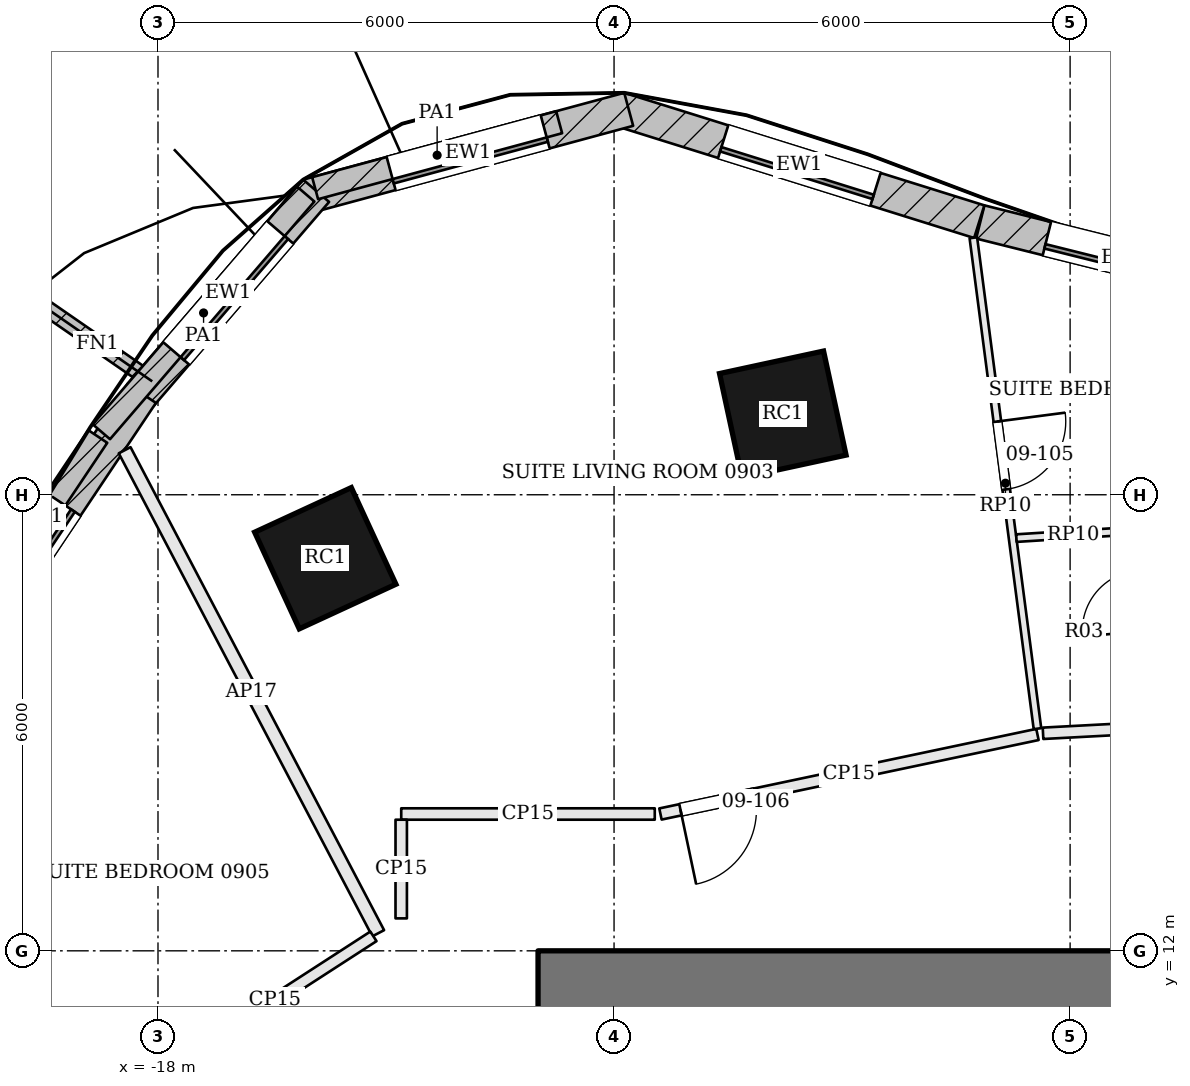
"""IFC4 building model, lengths in metres.
Left out: names, types, materials, properties, quantities, classifications, styles, units other than length and angle.
Written with IfcOpenShell. Run it as: python <this file> out.ifc"""

import sys

from ifc_helpers import new_model, si_unit, direction, frame, frame_2d, origin, origin_2d, place, context, subcontext, project, spatial, rectangle, extrude, element, fill, save


model = new_model("IFC4")
c1 = context("Model", 3, precision=1e-05, world=origin(), true_north=direction((0.0, 1.0)))
c2 = subcontext(c1, "Body", "Model", "MODEL_VIEW")
j1 = project(units=[si_unit("LENGTHUNIT", "METRE"), si_unit("PLANEANGLEUNIT", "RADIAN")], contexts=[c1])
p1 = place(None, origin())
s1 = spatial("IfcSite", under=j1, at=p1, CompositionType="ELEMENT")
p2 = place(p1, origin())
s2 = spatial("IfcBuilding", under=s1, at=p2, CompositionType="ELEMENT")
p3 = place(p2, frame((0.0, 0.0, 48.3)))
s3 = spatial("IfcBuildingStorey", under=s2, at=p3, CompositionType="ELEMENT", Elevation=48.3)
p4 = place(p3, frame((-13.0, 11.3, 0.0), z_axis=(0.0, 0.0, 1.0), x_axis=(1.0, 0.0, 0.0)))
e1 = element("IfcWall", 1, at=p4, inside=s3, PredefinedType="SHEAR", context=c2, shape_type="SweptSolid", body=[
    extrude(rectangle(XDim=26.0, YDim=1.4, at=frame_2d((13.0, 0.0))), origin(), (0.0, 0.0, 1.0), 3.6),
])
p5 = place(p4, frame((8.575, 0.0, 0.0)))
e2 = element("IfcOpeningElement", 2, at=p5, cuts=e1, PredefinedType="OPENING", context=c2, shape_type="SweptSolid", body=[
    extrude(rectangle(XDim=0.7, YDim=2.1, at=frame_2d((0.35, 1.05))), frame((0.0, 0.71, 0.0), z_axis=(0.0, -1.0, 0.0), x_axis=(1.0, 0.0, 0.0)), (0.0, 0.0, 1.0), 1.42),
])
p6 = place(p4, frame((10.875, 0.0, 0.0)))
e3 = element("IfcOpeningElement", 3, at=p6, cuts=e1, PredefinedType="OPENING", context=c2, shape_type="SweptSolid", body=[
    extrude(rectangle(XDim=1.0, YDim=2.1, at=frame_2d((0.5, 1.05))), frame((0.0, 0.71, 0.0), z_axis=(0.0, -1.0, 0.0), x_axis=(1.0, 0.0, 0.0)), (0.0, 0.0, 1.0), 1.42),
])
p7 = place(p4, frame((13.725, 0.0, 0.0)))
e4 = element("IfcOpeningElement", 4, at=p7, cuts=e1, PredefinedType="OPENING", context=c2, shape_type="SweptSolid", body=[
    extrude(rectangle(XDim=1.0, YDim=2.1, at=frame_2d((0.5, 1.05))), frame((0.0, 0.71, 0.0), z_axis=(0.0, -1.0, 0.0), x_axis=(1.0, 0.0, 0.0)), (0.0, 0.0, 1.0), 1.42),
])
p8 = place(p4, frame((16.175, 0.0, 0.0)))
e5 = element("IfcOpeningElement", 5, at=p8, cuts=e1, PredefinedType="OPENING", context=c2, shape_type="SweptSolid", body=[
    extrude(rectangle(XDim=1.0, YDim=2.1, at=frame_2d((0.5, 1.05))), frame((0.0, 0.71, 0.0), z_axis=(0.0, -1.0, 0.0), x_axis=(1.0, 0.0, 0.0)), (0.0, 0.0, 1.0), 1.42),
])
for number, where, z_axis, x_axis in (
    (6, (-9.78, 19.058, 0.0), (0.0, 0.0, 1.0), (-0.977, -0.211, 0.0)),
    (7, (-15.799, 17.165, 0.0), (0.0, 0.0, 1.0), (-0.908, -0.419, 0.0)),
):
    element("IfcColumn", number, at=place(p3, frame(where, z_axis=z_axis, x_axis=x_axis)), inside=s3, PredefinedType="COLUMN", context=c2, shape_type="SweptSolid", body=[
        extrude(rectangle(XDim=1.4, YDim=1.4, at=origin_2d()), origin(), (0.0, 0.0, 1.0), 3.6),
    ])
p9 = place(p3, frame((-3.392, 20.642, 0.0), z_axis=(0.0, 0.0, 1.0), x_axis=(-0.970168229467, 0.242432684539, 0.0)))
e8 = element("IfcWall", 8, at=p9, inside=s3, PredefinedType="SOLIDWALL", context=c2, shape_type="SweptSolid", body=[
    extrude(rectangle(XDim=3.906, YDim=0.45, at=frame_2d((1.953, 0.0))), origin(), (0.0, 0.0, 1.0), 3.4),
])
p10 = place(p9, frame((0.903, 0.0, 0.9)))
e9 = element("IfcOpeningElement", 9, at=p10, cuts=e8, PredefinedType="OPENING", context=c2, shape_type="SweptSolid", body=[
    extrude(rectangle(XDim=2.1, YDim=2.0, at=frame_2d((1.05, 1.0))), frame((0.0, 0.235, 0.0), z_axis=(0.0, -1.0, 0.0), x_axis=(1.0, 0.0, 0.0)), (0.0, 0.0, 1.0), 0.47),
])
p11 = place(p3, frame((-7.196, 21.593, 0.0), z_axis=(0.0, 0.0, 1.0), x_axis=(-0.954471218741, 0.298303021432, 0.0)))
e10 = element("IfcWall", 10, at=p11, inside=s3, PredefinedType="SOLIDWALL", context=c2, shape_type="SweptSolid", body=[
    extrude(rectangle(XDim=4.96, YDim=0.45, at=frame_2d((2.48, 0.0))), origin(), (0.0, 0.0, 1.0), 3.4),
])
p12 = place(p11, frame((1.43, 0.0, 0.9)))
e11 = element("IfcOpeningElement", 11, at=p12, cuts=e10, PredefinedType="OPENING", context=c2, shape_type="SweptSolid", body=[
    extrude(rectangle(XDim=2.1, YDim=2.0, at=frame_2d((1.05, 1.0))), frame((0.0, 0.235, 0.0), z_axis=(0.0, -1.0, 0.0), x_axis=(1.0, 0.0, 0.0)), (0.0, 0.0, 1.0), 0.47),
])
p13 = place(p3, frame((-11.807, 23.071, 0.0), z_axis=(0.0, 0.0, 1.0), x_axis=(-0.965334520334, -0.261015830653, 0.0)))
e12 = element("IfcWall", 12, at=p13, inside=s3, PredefinedType="SOLIDWALL", context=c2, shape_type="SweptSolid", body=[
    extrude(rectangle(XDim=4.375, YDim=0.45, at=frame_2d((2.188, 0.0))), origin(), (0.0, 0.0, 1.0), 3.4),
])
p14 = place(p13, frame((1.138, 0.0, 0.9)))
e13 = element("IfcOpeningElement", 13, at=p14, cuts=e12, PredefinedType="OPENING", context=c2, shape_type="SweptSolid", body=[
    extrude(rectangle(XDim=2.1, YDim=2.0, at=frame_2d((1.05, 1.0))), frame((0.0, 0.235, 0.0), z_axis=(0.0, -1.0, 0.0), x_axis=(1.0, 0.0, 0.0)), (0.0, 0.0, 1.0), 0.47),
])
p15 = place(p3, frame((-15.919, 21.999, 0.0), z_axis=(0.0, 0.0, 1.0), x_axis=(-0.652009971272, -0.758210391225, 0.0)))
e14 = element("IfcWall", 14, at=p15, inside=s3, PredefinedType="SOLIDWALL", context=c2, shape_type="SweptSolid", body=[
    extrude(rectangle(XDim=3.545, YDim=0.45, at=frame_2d((1.772, 0.0))), origin(), (0.0, 0.0, 1.0), 3.4),
])
p16 = place(p15, frame((0.722, 0.0, 0.9)))
e15 = element("IfcOpeningElement", 15, at=p16, cuts=e14, PredefinedType="OPENING", context=c2, shape_type="SweptSolid", body=[
    extrude(rectangle(XDim=2.1, YDim=2.0, at=frame_2d((1.05, 1.0))), frame((0.0, 0.235, 0.0), z_axis=(0.0, -1.0, 0.0), x_axis=(1.0, 0.0, 0.0)), (0.0, 0.0, 1.0), 0.47),
])
p17 = place(p3, frame((-18.214, 19.333, 0.0), z_axis=(0.0, 0.0, 1.0), x_axis=(-0.555833135316, -0.831293886471, 0.0)))
e16 = element("IfcWall", 16, at=p17, inside=s3, PredefinedType="SOLIDWALL", context=c2, shape_type="SweptSolid", body=[
    extrude(rectangle(XDim=5.368, YDim=0.45, at=frame_2d((2.684, 0.0))), origin(), (0.0, 0.0, 1.0), 3.4),
])
p18 = place(p17, frame((1.784, 0.0, 0.9)))
e17 = element("IfcOpeningElement", 17, at=p18, cuts=e16, PredefinedType="OPENING", context=c2, shape_type="SweptSolid", body=[
    extrude(rectangle(XDim=1.8, YDim=2.0, at=frame_2d((0.9, 1.0))), frame((0.0, 0.235, 0.0), z_axis=(0.0, -1.0, 0.0), x_axis=(1.0, 0.0, 0.0)), (0.0, 0.0, 1.0), 0.47),
])
p19 = place(p3, frame((-18.076, 19.492, 0.0), z_axis=(0.0, 0.0, 1.0), x_axis=(-0.822618823872, 0.568593238274, 0.0)))
e18 = element("IfcWall", 18, at=p19, inside=s3, PredefinedType="SOLIDWALL", context=c2, shape_type="SweptSolid", body=[
    extrude(rectangle(XDim=1.75, YDim=0.2, at=frame_2d((0.875, 0.0))), origin(), (0.0, 0.0, 1.0), 3.4),
])
p20 = place(p3, frame((-12.722, 22.901, 3.6), z_axis=(0.0, 0.0, 1.0), x_axis=(-0.96534590031, -0.260973739589, 0.0)))
e19 = element("IfcWall", 19, at=p20, inside=s3, PredefinedType="PARAPET", context=c2, shape_type="SweptSolid", body=[
    extrude(rectangle(XDim=3.326, YDim=0.3, at=frame_2d((1.663, 0.0))), origin(), (0.0, 0.0, 1.0), 1.1),
])
p21 = place(p3, frame((-16.056, 21.956, 3.6), z_axis=(0.0, 0.0, 1.0), x_axis=(-0.652038588201, -0.75818578165, 0.0)))
e20 = element("IfcWall", 20, at=p21, inside=s3, PredefinedType="PARAPET", context=c2, shape_type="SweptSolid", body=[
    extrude(rectangle(XDim=4.124, YDim=0.3, at=frame_2d((2.062, 0.0))), origin(), (0.0, 0.0, 1.0), 1.1),
])
p22 = place(p3, frame((-18.792, 18.767, 3.6), z_axis=(0.0, 0.0, 1.0), x_axis=(-0.555843382853, -0.831287034507, 0.0)))
e21 = element("IfcWall", 21, at=p22, inside=s3, PredefinedType="PARAPET", context=c2, shape_type="SweptSolid", body=[
    extrude(rectangle(XDim=2.562, YDim=0.3, at=frame_2d((1.281, 0.0))), origin(), (0.0, 0.0, 1.0), 1.1),
])
p23 = place(p3, frame((-3.027, 15.039, 0.0), z_axis=(0.0, 0.0, 1.0), x_axis=(-0.998589773409, -0.053089212123, 0.0)))
e22 = element("IfcWall", 22, at=p23, inside=s3, PredefinedType="PARTITIONING", context=c2, shape_type="SweptSolid", body=[
    extrude(rectangle(XDim=3.334, YDim=0.15, at=frame_2d((1.667, 0.0))), origin(), (0.0, 0.0, 1.0), 2.68),
])
p24 = place(p3, frame((-6.43, 14.846, 0.0), z_axis=(0.0, 0.0, 1.0), x_axis=(-0.978470502428, -0.206386714394, 0.0)))
e23 = element("IfcWall", 23, at=p24, inside=s3, PredefinedType="PARTITIONING", context=c2, shape_type="SweptSolid", body=[
    extrude(rectangle(XDim=5.069, YDim=0.15, at=frame_2d((2.534, 0.0))), origin(), (0.0, 0.0, 1.0), 2.68),
])
p25 = place(p24, frame((3.8, 0.0, 0.0)))
e24 = element("IfcOpeningElement", 24, at=p25, cuts=e23, PredefinedType="OPENING", context=c2, shape_type="SweptSolid", body=[
    extrude(rectangle(XDim=1.0, YDim=2.1, at=frame_2d((0.5, 1.05))), frame((0.0, 0.085, 0.0), z_axis=(0.0, -1.0, 0.0), x_axis=(1.0, 0.0, 0.0)), (0.0, 0.0, 1.0), 0.17),
])
p26 = place(p3, frame((-11.464, 13.8, 0.0), z_axis=(0.0, 0.0, 1.0), x_axis=(-1.0, 0.0, 0.0)))
e25 = element("IfcWall", 25, at=p26, inside=s3, PredefinedType="PARTITIONING", context=c2, shape_type="SweptSolid", body=[
    extrude(rectangle(XDim=3.336, YDim=0.15, at=frame_2d((1.668, 0.0))), origin(), (0.0, 0.0, 1.0), 2.68),
])
p27 = place(p3, frame((-14.8, 13.725, 0.0), z_axis=(0.0, 0.0, 1.0), x_axis=(-0.000188040613, -0.99999998232, 0.0)))
e26 = element("IfcWall", 26, at=p27, inside=s3, PredefinedType="PARTITIONING", context=c2, shape_type="SweptSolid", body=[
    extrude(rectangle(XDim=1.298, YDim=0.15, at=frame_2d((0.649, 0.0))), origin(), (0.0, 0.0, 1.0), 2.68),
])
p28 = place(p3, frame((-18.439, 18.586, 0.0), z_axis=(0.0, 0.0, 1.0), x_axis=(0.464815231758, -0.885407702884, 0.0)))
e27 = element("IfcWall", 27, at=p28, inside=s3, PredefinedType="PARTITIONING", context=c2, shape_type="SweptSolid", body=[
    extrude(rectangle(XDim=7.177, YDim=0.175, at=frame_2d((3.588, 0.0))), origin(), (0.0, 0.0, 1.0), 2.68),
])
p29 = place(p3, frame((-15.166, 12.19, 0.0), z_axis=(0.0, 0.0, 1.0), x_axis=(-0.839538287855, -0.54330052754, 0.0)))
e28 = element("IfcWall", 28, at=p29, inside=s3, PredefinedType="PARTITIONING", context=c2, shape_type="SweptSolid", body=[
    extrude(rectangle(XDim=3.083, YDim=0.15, at=frame_2d((1.542, 0.0))), origin(), (0.0, 0.0, 1.0), 2.68),
])
p30 = place(p3, frame((-7.273, 21.381, 0.0), z_axis=(0.0, 0.0, 1.0), x_axis=(0.129472190921, -0.991583053394, 0.0)))
e29 = element("IfcWall", 29, at=p30, inside=s3, PredefinedType="PARTITIONING", context=c2, shape_type="SweptSolid", body=[
    extrude(rectangle(XDim=6.513, YDim=0.1, at=frame_2d((3.257, 0.0))), origin(), (0.0, 0.0, 1.0), 2.934),
])
p31 = place(p30, frame((2.438, 0.0, 0.0)))
e30 = element("IfcOpeningElement", 30, at=p31, cuts=e29, PredefinedType="OPENING", context=c2, shape_type="SweptSolid", body=[
    extrude(rectangle(XDim=0.9, YDim=2.4, at=frame_2d((0.45, 1.2))), frame((0.0, 0.06, 0.0), z_axis=(0.0, -1.0, 0.0), x_axis=(1.0, 0.0, 0.0)), (0.0, 0.0, 1.0), 0.12),
])
p32 = place(p3, frame((-5.212, 17.524, 0.0), z_axis=(0.0, 0.0, 1.0), x_axis=(-0.998018174443, -0.062926333769, 0.0)))
e31 = element("IfcWall", 31, at=p32, inside=s3, PredefinedType="PARTITIONING", context=c2, shape_type="SweptSolid", body=[
    extrude(rectangle(XDim=1.498, YDim=0.1, at=frame_2d((0.749, 0.0))), origin(), (0.0, 0.0, 1.0), 2.934),
])
p33 = place(p3, frame((-18.731, 9.614, 0.0), z_axis=(0.0, 0.0, 1.0), x_axis=(-0.731286737376, 0.682070163354, 0.0)))
e32 = element("IfcWall", 32, at=p33, inside=s3, PredefinedType="PARTITIONING", context=c2, shape_type="SweptSolid", body=[
    extrude(rectangle(XDim=2.525, YDim=0.1, at=frame_2d((1.262, 0.0))), origin(), (0.0, 0.0, 1.0), 2.934),
])
p34 = place(p33, frame((1.2, 0.0, 0.0)))
e33 = element("IfcOpeningElement", 33, at=p34, cuts=e32, PredefinedType="OPENING", context=c2, shape_type="SweptSolid", body=[
    extrude(rectangle(XDim=0.8, YDim=2.1, at=frame_2d((0.4, 1.05))), frame((0.0, 0.06, 0.0), z_axis=(0.0, -1.0, 0.0), x_axis=(1.0, 0.0, 0.0)), (0.0, 0.0, 1.0), 0.12),
])
p35 = place(p10, origin())
e34 = element("IfcWindow", 34, at=p35, inside=s3, PartitioningType="SINGLE_PANEL", PredefinedType="WINDOW", context=c2, shape_type="SweptSolid", body=[
    extrude(rectangle(XDim=2.1, YDim=2.0, at=frame_2d((1.05, 1.0))), frame((0.0, 0.135, 0.0), z_axis=(0.0, -1.0, 0.0), x_axis=(1.0, 0.0, 0.0)), (0.0, 0.0, 1.0), 0.06),
])
fill(e9, e34)
p36 = place(p12, origin())
e35 = element("IfcWindow", 35, at=p36, inside=s3, PartitioningType="SINGLE_PANEL", PredefinedType="WINDOW", context=c2, shape_type="SweptSolid", body=[
    extrude(rectangle(XDim=2.1, YDim=2.0, at=frame_2d((1.05, 1.0))), frame((0.0, 0.135, 0.0), z_axis=(0.0, -1.0, 0.0), x_axis=(1.0, 0.0, 0.0)), (0.0, 0.0, 1.0), 0.06),
])
fill(e11, e35)
p37 = place(p14, origin())
e36 = element("IfcWindow", 36, at=p37, inside=s3, PartitioningType="SINGLE_PANEL", PredefinedType="WINDOW", context=c2, shape_type="SweptSolid", body=[
    extrude(rectangle(XDim=2.1, YDim=2.0, at=frame_2d((1.05, 1.0))), frame((0.0, 0.135, 0.0), z_axis=(0.0, -1.0, 0.0), x_axis=(1.0, 0.0, 0.0)), (0.0, 0.0, 1.0), 0.06),
])
fill(e13, e36)
p38 = place(p16, origin())
e37 = element("IfcWindow", 37, at=p38, inside=s3, PartitioningType="SINGLE_PANEL", PredefinedType="WINDOW", context=c2, shape_type="SweptSolid", body=[
    extrude(rectangle(XDim=2.1, YDim=2.0, at=frame_2d((1.05, 1.0))), frame((0.0, 0.135, 0.0), z_axis=(0.0, -1.0, 0.0), x_axis=(1.0, 0.0, 0.0)), (0.0, 0.0, 1.0), 0.06),
])
fill(e15, e37)
p39 = place(p18, origin())
e38 = element("IfcWindow", 38, at=p39, inside=s3, PartitioningType="SINGLE_PANEL", PredefinedType="WINDOW", context=c2, shape_type="SweptSolid", body=[
    extrude(rectangle(XDim=1.8, YDim=2.0, at=frame_2d((0.9, 1.0))), frame((0.0, 0.135, 0.0), z_axis=(0.0, -1.0, 0.0), x_axis=(1.0, 0.0, 0.0)), (0.0, 0.0, 1.0), 0.06),
])
fill(e17, e38)
p40 = place(p31, origin())
e39 = element("IfcDoor", 39, at=p40, inside=s3, OperationType="SINGLE_SWING_LEFT", PredefinedType="DOOR", context=c2, shape_type="SweptSolid", body=[
    extrude(rectangle(XDim=0.9, YDim=2.4, at=frame_2d((0.45, 1.2))), frame((0.0, 0.025, 0.0), z_axis=(0.0, -1.0, 0.0), x_axis=(1.0, 0.0, 0.0)), (0.0, 0.0, 1.0), 0.05),
])
fill(e30, e39)
p41 = place(p25, origin())
e40 = element("IfcDoor", 40, at=p41, inside=s3, OperationType="SINGLE_SWING_RIGHT", PredefinedType="DOOR", context=c2, shape_type="SweptSolid", body=[
    extrude(rectangle(XDim=1.0, YDim=2.1, at=frame_2d((0.5, 1.05))), frame((0.0, 0.025, 0.0), z_axis=(0.0, -1.0, 0.0), x_axis=(1.0, 0.0, 0.0)), (0.0, 0.0, 1.0), 0.05),
])
fill(e24, e40)
save(model, sys.argv[1])
